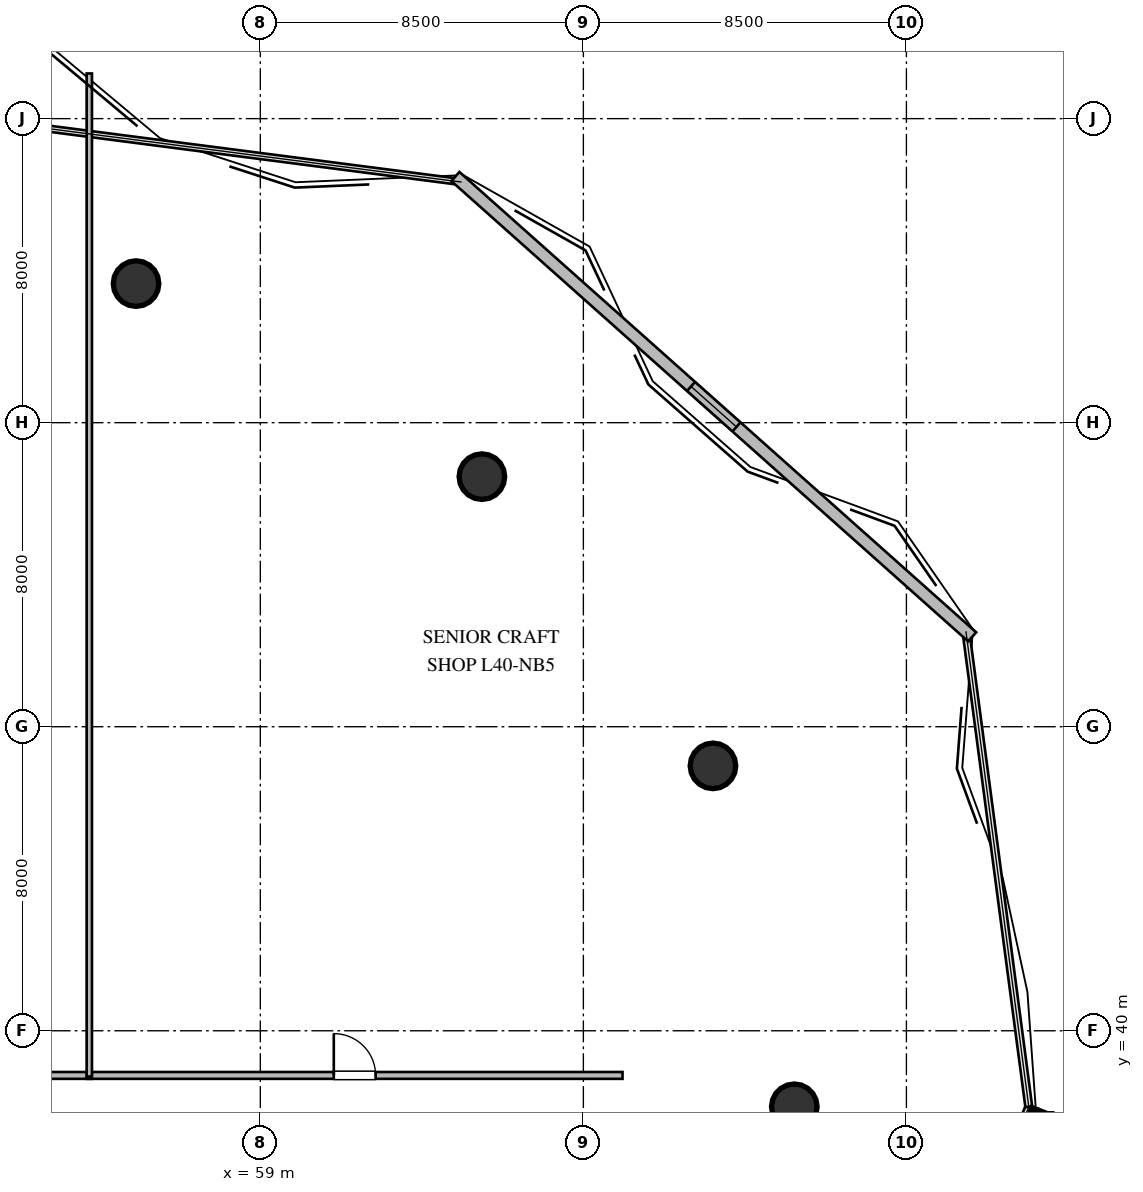
"""IFC4 building model, lengths in metres.
Left out: names, types, materials, properties, quantities, classifications, styles, units other than length and angle.
Written with IfcOpenShell. Run it as: python <this file> out.ifc"""

import sys

from ifc_helpers import new_model, si_unit, direction, frame, frame_2d, origin, origin_2d, place, context, subcontext, project, spatial, rectangle, circle, extrude, element, fill, save


model = new_model("IFC4")
c1 = context("Model", 3, precision=1e-05, world=origin(), true_north=direction((0.0, 1.0)))
c2 = subcontext(c1, "Body", "Model", "MODEL_VIEW")
j1 = project(units=[si_unit("LENGTHUNIT", "METRE"), si_unit("PLANEANGLEUNIT", "RADIAN")], contexts=[c1])
p1 = place(None, origin())
s1 = spatial("IfcSite", under=j1, at=p1, CompositionType="ELEMENT")
p2 = place(p1, origin())
s2 = spatial("IfcBuilding", under=s1, at=p2, CompositionType="ELEMENT")
p3 = place(p2, frame((0.0, 0.0, 153.0)))
s3 = spatial("IfcBuildingStorey", under=s2, at=p3, CompositionType="ELEMENT", Elevation=153.0)
for number, where, z_axis, x_axis in (
    (1, (73.05, 38.0, 0.0), (0.0, 0.0, 1.0), (1.0, 0.0, 0.0)),
    (2, (70.91, 46.97, 0.0), (0.0, 0.0, 1.0), (1.0, 0.0, 0.0)),
    (3, (64.83, 54.58, 0.0), (0.0, 0.0, 1.0), (1.0, 0.0, 0.0)),
    (4, (55.73, 59.66, 0.0), (0.0, 0.0, 1.0), (1.0, 0.0, 0.0)),
):
    element("IfcColumn", number, at=place(p3, frame(where, z_axis=z_axis, x_axis=x_axis)), inside=s3, PredefinedType="COLUMN", context=c2, shape_type="SweptSolid", body=[
        extrude(circle(Radius=0.6, at=origin_2d()), origin(), (0.0, 0.0, 1.0), 3.6),
    ])
p4 = place(p3, frame((64.132, 62.477, 0.0), z_axis=(0.0, 0.0, 1.0), x_axis=(0.746726187299, -0.665131566836, 0.0)))
e5 = element("IfcWall", 5, at=p4, inside=s3, PredefinedType="STANDARD", context=c2, shape_type="SweptSolid", body=[
    extrude(rectangle(XDim=18.21, YDim=0.32, at=frame_2d((9.105, 0.0))), origin(), (0.0, 0.0, 1.0), 3.36),
])
p5 = place(p4, frame((8.305, 0.0, 1.05)))
e6 = element("IfcOpeningElement", 6, at=p5, cuts=e5, PredefinedType="OPENING", context=c2, shape_type="SweptSolid", body=[
    extrude(rectangle(XDim=1.6, YDim=1.5, at=frame_2d((0.8, 0.75))), frame((0.0, 0.17, 0.0), z_axis=(0.0, -1.0, 0.0), x_axis=(1.0, 0.0, 0.0)), (0.0, 0.0, 1.0), 0.34),
])
p6 = place(p3, frame((49.435, 38.825, 0.0), z_axis=(0.0, 0.0, 1.0), x_axis=(1.0, 0.0, 0.0)))
e7 = element("IfcWall", 7, at=p6, inside=s3, PredefinedType="PARTITIONING", context=c2, shape_type="SweptSolid", body=[
    extrude(rectangle(XDim=5.13, YDim=0.18, at=frame_2d((2.565, 0.0))), origin(), (0.0, 0.0, 1.0), 3.36),
])
p7 = place(p6, frame((2.015, 0.0, 0.0)))
e8 = element("IfcOpeningElement", 8, at=p7, cuts=e7, PredefinedType="OPENING", context=c2, shape_type="SweptSolid", body=[
    extrude(rectangle(XDim=1.1, YDim=2.1, at=frame_2d((0.55, 1.05))), frame((0.0, 0.1, 0.0), z_axis=(0.0, -1.0, 0.0), x_axis=(1.0, 0.0, 0.0)), (0.0, 0.0, 1.0), 0.2),
])
p8 = place(p3, frame((54.435, 38.825, 0.0), z_axis=(0.0, 0.0, 1.0), x_axis=(1.0, 0.0, 0.0)))
e9 = element("IfcWall", 9, at=p8, inside=s3, PredefinedType="PARTITIONING", context=c2, shape_type="SweptSolid", body=[
    extrude(rectangle(XDim=14.095, YDim=0.18, at=frame_2d((7.047, 0.0))), origin(), (0.0, 0.0, 1.0), 3.36),
])
p9 = place(p8, frame((6.498, 0.0, 0.0)))
e10 = element("IfcOpeningElement", 10, at=p9, cuts=e9, PredefinedType="OPENING", context=c2, shape_type="SweptSolid", body=[
    extrude(rectangle(XDim=1.1, YDim=2.1, at=frame_2d((0.55, 1.05))), frame((0.0, 0.1, 0.0), z_axis=(0.0, -1.0, 0.0), x_axis=(1.0, 0.0, 0.0)), (0.0, 0.0, 1.0), 0.2),
])
p10 = place(p3, frame((54.5, 65.188, 0.0), z_axis=(0.0, 0.0, 1.0), x_axis=(0.0, -1.0, 0.0)))
e11 = element("IfcWall", 11, at=p10, inside=s3, PredefinedType="PARTITIONING", context=c2, shape_type="SweptSolid", body=[
    extrude(rectangle(XDim=26.393, YDim=0.14, at=frame_2d((13.197, 0.0))), origin(), (0.0, 0.0, 1.0), 3.36),
])
p11 = place(p5, origin())
e12 = element("IfcWindow", 12, at=p11, inside=s3, PartitioningType="SINGLE_PANEL", PredefinedType="WINDOW", context=c2, shape_type="SweptSolid", body=[
    extrude(rectangle(XDim=1.6, YDim=1.5, at=frame_2d((0.8, 0.75))), frame((0.0, 0.03, 0.0), z_axis=(0.0, -1.0, 0.0), x_axis=(1.0, 0.0, 0.0)), (0.0, 0.0, 1.0), 0.06),
])
fill(e6, e12)
p12 = place(p9, origin())
e13 = element("IfcDoor", 13, at=p12, inside=s3, OperationType="SINGLE_SWING_LEFT", PredefinedType="DOOR", context=c2, shape_type="SweptSolid", body=[
    extrude(rectangle(XDim=1.1, YDim=2.1, at=frame_2d((0.55, 1.05))), frame((0.0, 0.025, 0.0), z_axis=(0.0, -1.0, 0.0), x_axis=(1.0, 0.0, 0.0)), (0.0, 0.0, 1.0), 0.05),
])
fill(e10, e13)
save(model, sys.argv[1])
